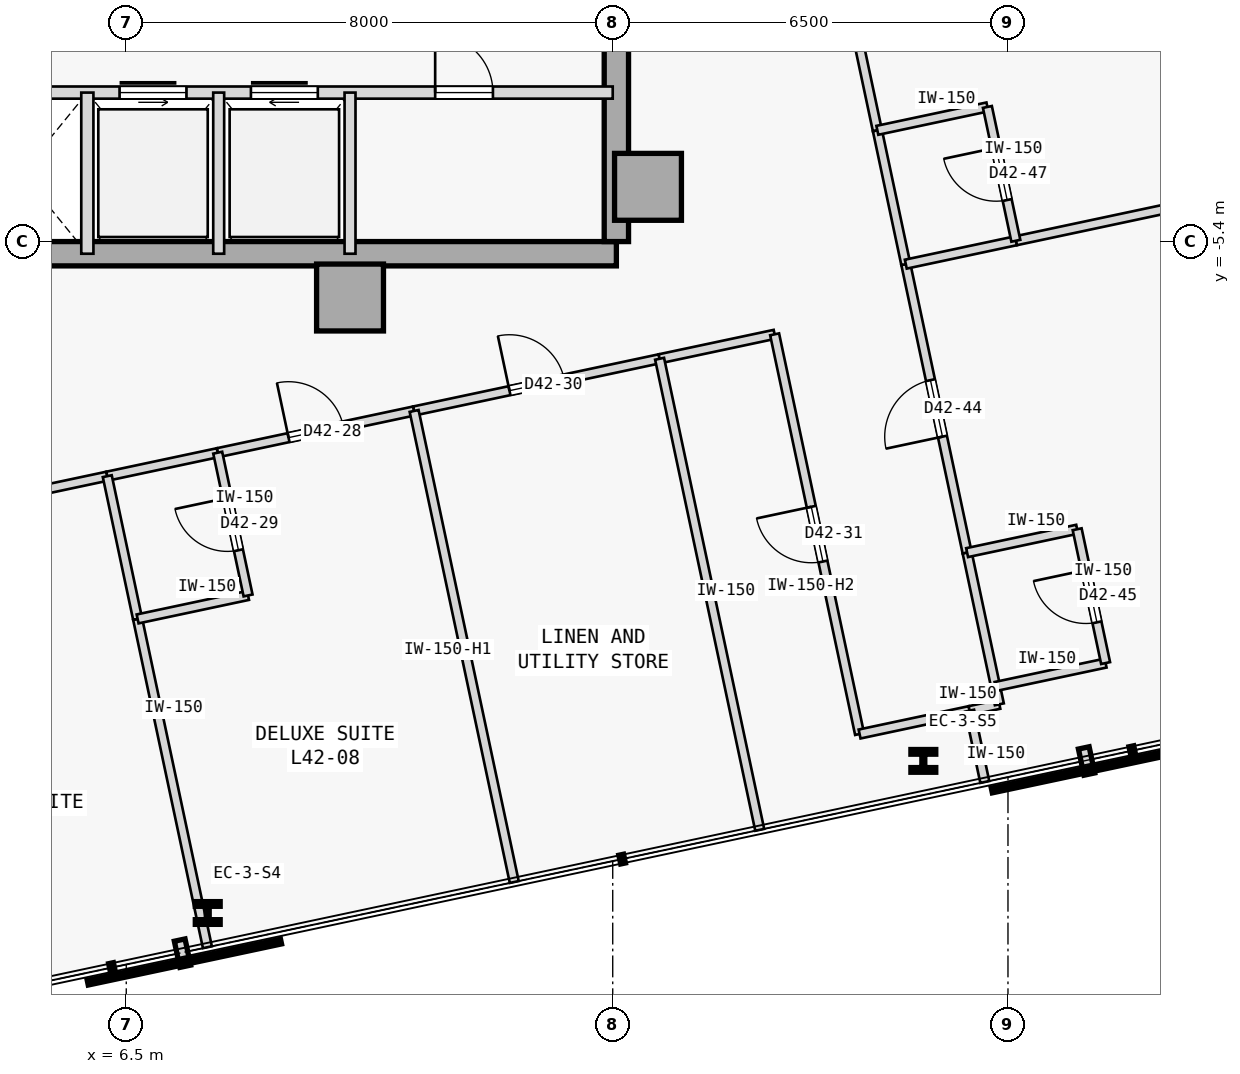
"""IFC4 building model, lengths in metres.
Left out: names, types, materials, properties, quantities, classifications, styles, units other than length and angle.
Written with IfcOpenShell. Run it as: python <this file> out.ifc"""

import sys

from ifc_helpers import new_model, si_unit, direction, frame, frame_2d, origin, origin_2d, place, context, subcontext, project, spatial, rectangle, i_section, extrude, element, fill, save


model = new_model("IFC4")
c1 = context("Model", 3, precision=1e-05, world=origin(), true_north=direction((0.0, 1.0)))
c2 = subcontext(c1, "Body", "Model", "MODEL_VIEW")
j1 = project(units=[si_unit("LENGTHUNIT", "METRE"), si_unit("PLANEANGLEUNIT", "RADIAN")], contexts=[c1])
p1 = place(None, origin())
s1 = spatial("IfcSite", under=j1, at=p1, CompositionType="ELEMENT")
p2 = place(p1, origin())
s2 = spatial("IfcBuilding", under=s1, at=p2, CompositionType="ELEMENT")
p3 = place(p2, frame((0.0, 0.0, 165.0)))
s3 = spatial("IfcBuildingStorey", under=s2, at=p3, CompositionType="ELEMENT", Elevation=165.0)
for number, where, z_axis, x_axis in (
    (1, (15.08, -4.5, 0.0), (0.0, 0.0, 1.0), (1.0, 0.0, 0.0)),
    (2, (10.18, -6.32, 0.0), (0.0, 0.0, 1.0), (1.0, 0.0, 0.0)),
):
    element("IfcColumn", number, at=place(p3, frame(where, z_axis=z_axis, x_axis=x_axis)), inside=s3, PredefinedType="COLUMN", context=c2, shape_type="SweptSolid", body=[
        extrude(rectangle(XDim=1.1, YDim=1.1, at=origin_2d()), origin(), (0.0, 0.0, 1.0), 3.4),
    ])
p4 = place(p3, frame((3.7, -5.6, 0.0), z_axis=(0.0, 0.0, 1.0), x_axis=(1.0, 0.0, 0.0)))
e3 = element("IfcWall", 3, at=p4, inside=s3, PredefinedType="SHEAR", context=c2, shape_type="SweptSolid", body=[
    extrude(rectangle(XDim=10.86, YDim=0.4, at=frame_2d((5.43, 0.0))), origin(), (0.0, 0.0, 1.0), 3.175),
])
p5 = place(p3, frame((14.56, -5.4, 0.0), z_axis=(0.0, 0.0, 1.0), x_axis=(0.0, 1.0, 0.0)))
e4 = element("IfcWall", 4, at=p5, inside=s3, PredefinedType="SHEAR", context=c2, shape_type="SweptSolid", body=[
    extrude(rectangle(XDim=10.8, YDim=0.4, at=frame_2d((5.4, 0.0))), origin(), (0.0, 0.0, 1.0), 3.175),
])
for number, where, z_axis, x_axis in (
    (5, (7.84, -16.441, 0.0), (0.0, 0.0, 1.0), (1.0, 0.0, 0.0)),
    (6, (19.608, -13.94, 0.0), (0.0, 0.0, 1.0), (1.0, 0.0, 0.0)),
):
    element("IfcColumn", number, at=place(p3, frame(where, z_axis=z_axis, x_axis=x_axis)), inside=s3, PredefinedType="COLUMN", context=c2, shape_type="SweptSolid", body=[
        extrude(i_section(OverallWidth=0.409, OverallDepth=0.374, WebThickness=0.048, FlangeThickness=0.077, FilletRadius=0.015, at=origin_2d()), origin(), (0.0, 0.0, 1.0), 3.4),
    ])
p6 = place(p3, frame((3.7, -2.95, 0.0), z_axis=(0.0, 0.0, 1.0), x_axis=(1.0, 0.0, 0.0)))
e7 = element("IfcWall", 7, at=p6, inside=s3, PredefinedType="STANDARD", context=c2, shape_type="SweptSolid", body=[
    extrude(rectangle(XDim=10.8, YDim=0.2, at=frame_2d((5.4, 0.0))), origin(), (0.0, 0.0, 1.0), 3.175),
])
p7 = place(p6, frame((2.69, 0.0, 0.0)))
e8 = element("IfcOpeningElement", 8, at=p7, cuts=e7, PredefinedType="OPENING", context=c2, shape_type="SweptSolid", body=[
    extrude(rectangle(XDim=1.1, YDim=2.15, at=frame_2d((0.55, 1.075))), frame((0.0, 0.11, 0.0), z_axis=(0.0, -1.0, 0.0), x_axis=(1.0, 0.0, 0.0)), (0.0, 0.0, 1.0), 0.22),
])
p8 = place(p6, frame((4.85, 0.0, 0.0)))
e9 = element("IfcOpeningElement", 9, at=p8, cuts=e7, PredefinedType="OPENING", context=c2, shape_type="SweptSolid", body=[
    extrude(rectangle(XDim=1.1, YDim=2.15, at=frame_2d((0.55, 1.075))), frame((0.0, 0.11, 0.0), z_axis=(0.0, -1.0, 0.0), x_axis=(1.0, 0.0, 0.0)), (0.0, 0.0, 1.0), 0.22),
])
p9 = place(p6, frame((7.88, 0.0, 0.0)))
e10 = element("IfcOpeningElement", 10, at=p9, cuts=e7, PredefinedType="OPENING", context=c2, shape_type="SweptSolid", body=[
    extrude(rectangle(XDim=0.95, YDim=2.15, at=frame_2d((0.475, 1.075))), frame((0.0, 0.11, 0.0), z_axis=(0.0, -1.0, 0.0), x_axis=(1.0, 0.0, 0.0)), (0.0, 0.0, 1.0), 0.22),
])
p10 = place(p3, frame((5.86, -5.6, 0.0), z_axis=(0.0, 0.0, 1.0), x_axis=(0.0, 1.0, 0.0)))
e11 = element("IfcWall", 11, at=p10, inside=s3, PredefinedType="STANDARD", context=c2, shape_type="SweptSolid", body=[
    extrude(rectangle(XDim=2.65, YDim=0.2, at=frame_2d((1.325, 0.0))), origin(), (0.0, 0.0, 1.0), 3.175),
])
for number, where, z_axis, x_axis in (
    (12, (10.18, -5.6, 0.0), (0.0, 0.0, 1.0), (0.0, 1.0, 0.0)),
    (13, (8.02, -5.6, 0.0), (0.0, 0.0, 1.0), (0.0, 1.0, 0.0)),
):
    element("IfcWall", number, at=place(p3, frame(where, z_axis=z_axis, x_axis=x_axis)), inside=s3, PredefinedType="STANDARD", context=c2, shape_type="SweptSolid", body=[
        extrude(rectangle(XDim=2.65, YDim=0.18, at=frame_2d((1.325, 0.0))), origin(), (0.0, 0.0, 1.0), 3.175),
    ])
p11 = place(p3, frame((2.743, -9.99, 0.0), z_axis=(0.0, 0.0, 1.0), x_axis=(0.978153036861, 0.207886114205, 0.0)))
e14 = element("IfcWall", 14, at=p11, inside=s3, PredefinedType="PARTITIONING", context=c2, shape_type="SweptSolid", body=[
    extrude(rectangle(XDim=3.522, YDim=0.15, at=frame_2d((1.761, 0.0))), origin(), (0.0, 0.0, 1.0), 3.175),
])
p12 = place(p11, frame((1.301, 0.0, 0.0)))
e15 = element("IfcOpeningElement", 15, at=p12, cuts=e14, PredefinedType="OPENING", context=c2, shape_type="SweptSolid", body=[
    extrude(rectangle(XDim=0.92, YDim=2.15, at=frame_2d((0.46, 1.075))), frame((0.0, 0.085, 0.0), z_axis=(0.0, -1.0, 0.0), x_axis=(1.0, 0.0, 0.0)), (0.0, 0.0, 1.0), 0.17),
])
p13 = place(p3, frame((8.004, -8.872, 0.0), z_axis=(0.0, 0.0, 1.0), x_axis=(0.97814625873, 0.20791800435, 0.0)))
e16 = element("IfcWall", 16, at=p13, inside=s3, PredefinedType="PARTITIONING", context=c2, shape_type="SweptSolid", body=[
    extrude(rectangle(XDim=3.302, YDim=0.15, at=frame_2d((1.651, 0.0))), origin(), (0.0, 0.0, 1.0), 3.175),
])
p14 = place(p13, frame((1.191, 0.0, 0.0)))
e17 = element("IfcOpeningElement", 17, at=p14, cuts=e16, PredefinedType="OPENING", context=c2, shape_type="SweptSolid", body=[
    extrude(rectangle(XDim=0.92, YDim=2.15, at=frame_2d((0.46, 1.075))), frame((0.0, 0.085, 0.0), z_axis=(0.0, -1.0, 0.0), x_axis=(1.0, 0.0, 0.0)), (0.0, 0.0, 1.0), 0.17),
])
p15 = place(p3, frame((6.188, -9.258, 0.0), z_axis=(0.0, 0.0, 1.0), x_axis=(0.978132112624, 0.207984543303, 0.0)))
e18 = element("IfcWall", 18, at=p15, inside=s3, PredefinedType="PARTITIONING", context=c2, shape_type="SweptSolid", body=[
    extrude(rectangle(XDim=1.857, YDim=0.15, at=frame_2d((0.928, 0.0))), origin(), (0.0, 0.0, 1.0), 3.175),
])
p16 = place(p3, frame((11.234, -8.185, 0.0), z_axis=(0.0, 0.0, 1.0), x_axis=(0.978155092113, 0.207876443525, 0.0)))
e19 = element("IfcWall", 19, at=p16, inside=s3, PredefinedType="PARTITIONING", context=c2, shape_type="SweptSolid", body=[
    extrude(rectangle(XDim=4.127, YDim=0.15, at=frame_2d((2.063, 0.0))), origin(), (0.0, 0.0, 1.0), 3.175),
])
p17 = place(p16, frame((1.604, 0.0, 0.0)))
e20 = element("IfcOpeningElement", 20, at=p17, cuts=e19, PredefinedType="OPENING", context=c2, shape_type="SweptSolid", body=[
    extrude(rectangle(XDim=0.92, YDim=2.15, at=frame_2d((0.46, 1.075))), frame((0.0, 0.085, 0.0), z_axis=(0.0, -1.0, 0.0), x_axis=(1.0, 0.0, 0.0)), (0.0, 0.0, 1.0), 0.17),
])
p18 = place(p3, frame((15.271, -7.327, 0.0), z_axis=(0.0, 0.0, 1.0), x_axis=(0.978150188204, 0.207899517354, 0.0)))
e21 = element("IfcWall", 21, at=p18, inside=s3, PredefinedType="PARTITIONING", context=c2, shape_type="SweptSolid", body=[
    extrude(rectangle(XDim=1.934, YDim=0.15, at=frame_2d((0.967, 0.0))), origin(), (0.0, 0.0, 1.0), 3.175),
])
p19 = place(p3, frame((18.56, -13.498, 0.0), z_axis=(0.0, 0.0, 1.0), x_axis=(-0.207888737749, 0.978152479278, 0.0)))
e22 = element("IfcWall", 22, at=p19, inside=s3, PredefinedType="PARTITIONING", context=c2, shape_type="SweptSolid", body=[
    extrude(rectangle(XDim=6.72, YDim=0.15, at=frame_2d((3.36, 0.0))), origin(), (0.0, 0.0, 1.0), 2.575),
])
p20 = place(p19, frame((2.9, 0.0, 0.0)))
e23 = element("IfcOpeningElement", 23, at=p20, cuts=e22, PredefinedType="OPENING", context=c2, shape_type="SweptSolid", body=[
    extrude(rectangle(XDim=0.92, YDim=2.15, at=frame_2d((0.46, 1.075))), frame((0.0, 0.085, 0.0), z_axis=(0.0, -1.0, 0.0), x_axis=(1.0, 0.0, 0.0)), (0.0, 0.0, 1.0), 0.17),
])
p21 = place(p3, frame((18.56, -13.498, 0.0), z_axis=(0.0, 0.0, 1.0), x_axis=(0.978160192495, 0.207852442415, 0.0)))
e24 = element("IfcWall", 24, at=p21, inside=s3, PredefinedType="PARTITIONING", context=c2, shape_type="SweptSolid", body=[
    extrude(rectangle(XDim=1.85, YDim=0.15, at=frame_2d((0.925, 0.0))), origin(), (0.0, 0.0, 1.0), 3.175),
])
p22 = place(p3, frame((20.369, -13.114, 0.0), z_axis=(0.0, 0.0, 1.0), x_axis=(0.978143962546, 0.207928806409, 0.0)))
e25 = element("IfcWall", 25, at=p22, inside=s3, PredefinedType="PARTITIONING", context=c2, shape_type="SweptSolid", body=[
    extrude(rectangle(XDim=0.5, YDim=0.15, at=frame_2d((0.25, 0.0))), origin(), (0.0, 0.0, 1.0), 3.175),
])
p23 = place(p3, frame((20.858, -13.01, 0.0), z_axis=(0.0, 0.0, 1.0), x_axis=(-0.208306395052, 0.978063620518, 0.0)))
e26 = element("IfcWall", 26, at=p23, inside=s3, PredefinedType="PARTITIONING", context=c2, shape_type="SweptSolid", body=[
    extrude(rectangle(XDim=0.3, YDim=0.15, at=frame_2d((0.15, 0.0))), origin(), (0.0, 0.0, 1.0), 3.175),
])
p24 = place(p3, frame((20.328, -10.515, 0.0), z_axis=(0.0, 0.0, 1.0), x_axis=(-0.207950868925, 0.97813927235, 0.0)))
e27 = element("IfcWall", 27, at=p24, inside=s3, PredefinedType="PARTITIONING", context=c2, shape_type="SweptSolid", body=[
    extrude(rectangle(XDim=4.85, YDim=0.15, at=frame_2d((2.425, 0.0))), origin(), (0.0, 0.0, 1.0), 3.175),
])
p25 = place(p24, frame((1.95, 0.0, 0.0)))
e28 = element("IfcOpeningElement", 28, at=p25, cuts=e27, PredefinedType="OPENING", context=c2, shape_type="SweptSolid", body=[
    extrude(rectangle(XDim=0.95, YDim=2.15, at=frame_2d((0.475, 1.075))), frame((0.0, 0.085, 0.0), z_axis=(0.0, -1.0, 0.0), x_axis=(1.0, 0.0, 0.0)), (0.0, 0.0, 1.0), 0.17),
])
p26 = place(p3, frame((20.796, -12.716, 0.0), z_axis=(0.0, 0.0, 1.0), x_axis=(-0.207891197838, 0.978151956427, 0.0)))
e29 = element("IfcWall", 29, at=p26, inside=s3, PredefinedType="PARTITIONING", context=c2, shape_type="SweptSolid", body=[
    extrude(rectangle(XDim=2.25, YDim=0.15, at=frame_2d((1.125, 0.0))), origin(), (0.0, 0.0, 1.0), 3.175),
])
p27 = place(p3, frame((18.852, -3.571, 0.0), z_axis=(0.0, 0.0, 1.0), x_axis=(-0.207879907349, 0.978154355979, 0.0)))
e30 = element("IfcWall", 30, at=p27, inside=s3, PredefinedType="PARTITIONING", context=c2, shape_type="SweptSolid", body=[
    extrude(rectangle(XDim=6.35, YDim=0.15, at=frame_2d((3.175, 0.0))), origin(), (0.0, 0.0, 1.0), 3.175),
])
p28 = place(p27, frame((2.7, 0.0, 0.0)))
e31 = element("IfcOpeningElement", 31, at=p28, cuts=e30, PredefinedType="OPENING", context=c2, shape_type="SweptSolid", body=[
    extrude(rectangle(XDim=0.95, YDim=2.15, at=frame_2d((0.475, 1.075))), frame((0.0, 0.085, 0.0), z_axis=(0.0, -1.0, 0.0), x_axis=(1.0, 0.0, 0.0)), (0.0, 0.0, 1.0), 0.17),
])
p29 = place(p3, frame((19.32, -5.771, 0.0), z_axis=(0.0, 0.0, 1.0), x_axis=(-0.207913264065, 0.978147266328, 0.0)))
e32 = element("IfcWall", 32, at=p29, inside=s3, PredefinedType="PARTITIONING", context=c2, shape_type="SweptSolid", body=[
    extrude(rectangle(XDim=2.25, YDim=0.15, at=frame_2d((1.125, 0.0))), origin(), (0.0, 0.0, 1.0), 3.175),
])
p30 = place(p3, frame((7.834, -17.005, 0.0), z_axis=(0.0, 0.0, 1.0), x_axis=(-0.207882560392, 0.978153792144, 0.0)))
e33 = element("IfcWall", 33, at=p30, inside=s3, PredefinedType="PARTITIONING", context=c2, shape_type="SweptSolid", body=[
    extrude(rectangle(XDim=5.52, YDim=0.15, at=frame_2d((2.76, 0.0))), origin(), (0.0, 0.0, 1.0), 3.175),
])
p31 = place(p3, frame((6.687, -11.606, 0.0), z_axis=(0.0, 0.0, 1.0), x_axis=(-0.207917150959, 0.978146440129, 0.0)))
e34 = element("IfcWall", 34, at=p31, inside=s3, PredefinedType="PARTITIONING", context=c2, shape_type="SweptSolid", body=[
    extrude(rectangle(XDim=2.4, YDim=0.15, at=frame_2d((1.2, 0.0))), origin(), (0.0, 0.0, 1.0), 3.175),
])
p32 = place(p3, frame((6.687, -11.606, 0.0), z_axis=(0.0, 0.0, 1.0), x_axis=(0.978132112624, 0.207984543303, 0.0)))
e35 = element("IfcWall", 35, at=p32, inside=s3, PredefinedType="PARTITIONING", context=c2, shape_type="SweptSolid", body=[
    extrude(rectangle(XDim=1.857, YDim=0.15, at=frame_2d((0.928, 0.0))), origin(), (0.0, 0.0, 1.0), 3.175),
])
p33 = place(p3, frame((8.503, -11.219, 0.0), z_axis=(0.0, 0.0, 1.0), x_axis=(-0.207917150959, 0.978146440129, 0.0)))
e36 = element("IfcWall", 36, at=p33, inside=s3, PredefinedType="PARTITIONING", context=c2, shape_type="SweptSolid", body=[
    extrude(rectangle(XDim=2.4, YDim=0.15, at=frame_2d((1.2, 0.0))), origin(), (0.0, 0.0, 1.0), 3.175),
])
p34 = place(p33, frame((0.76, 0.0, 0.0)))
e37 = element("IfcOpeningElement", 37, at=p34, cuts=e36, PredefinedType="OPENING", context=c2, shape_type="SweptSolid", body=[
    extrude(rectangle(XDim=0.88, YDim=2.15, at=frame_2d((0.44, 1.075))), frame((0.0, 0.085, 0.0), z_axis=(0.0, -1.0, 0.0), x_axis=(1.0, 0.0, 0.0)), (0.0, 0.0, 1.0), 0.17),
])
p35 = place(p3, frame((12.881, -15.932, 0.0), z_axis=(0.0, 0.0, 1.0), x_axis=(-0.207916267651, 0.978146627887, 0.0)))
e38 = element("IfcWall", 38, at=p35, inside=s3, PredefinedType="PARTITIONING", context=c2, shape_type="SweptSolid", body=[
    extrude(rectangle(XDim=7.92, YDim=0.15, at=frame_2d((3.96, 0.0))), origin(), (0.0, 0.0, 1.0), 2.725),
])
p36 = place(p3, frame((16.917, -15.074, 0.0), z_axis=(0.0, 0.0, 1.0), x_axis=(-0.207922536845, 0.978145295277, 0.0)))
e39 = element("IfcWall", 39, at=p36, inside=s3, PredefinedType="PARTITIONING", context=c2, shape_type="SweptSolid", body=[
    extrude(rectangle(XDim=7.92, YDim=0.15, at=frame_2d((3.96, 0.0))), origin(), (0.0, 0.0, 1.0), 3.175),
])
p37 = place(p3, frame((20.619, -14.288, 0.0), z_axis=(0.0, 0.0, 1.0), x_axis=(-0.207917150959, 0.978146440129, 0.0)))
e40 = element("IfcWall", 40, at=p37, inside=s3, PredefinedType="PARTITIONING", context=c2, shape_type="SweptSolid", body=[
    extrude(rectangle(XDim=1.2, YDim=0.15, at=frame_2d((0.6, 0.0))), origin(), (0.0, 0.0, 1.0), 3.175),
])
for number, where, z_axis, x_axis in (
    (41, (20.796, -12.716, 0.0), (0.0, 0.0, 1.0), (0.978, 0.208, 0.0)),
    (42, (20.328, -10.515, 0.0), (0.0, 0.0, 1.0), (0.978, 0.208, 0.0)),
):
    element("IfcWall", number, at=place(p3, frame(where, z_axis=z_axis, x_axis=x_axis)), inside=s3, PredefinedType="PARTITIONING", context=c2, shape_type="SweptSolid", body=[
        extrude(rectangle(XDim=1.85, YDim=0.15, at=frame_2d((0.925, 0.0))), origin(), (0.0, 0.0, 1.0), 3.175),
    ])
p38 = place(p3, frame((22.605, -12.332, 0.0), z_axis=(0.0, 0.0, 1.0), x_axis=(-0.207891197838, 0.978151956427, 0.0)))
e43 = element("IfcWall", 43, at=p38, inside=s3, PredefinedType="PARTITIONING", context=c2, shape_type="SweptSolid", body=[
    extrude(rectangle(XDim=2.25, YDim=0.15, at=frame_2d((1.125, 0.0))), origin(), (0.0, 0.0, 1.0), 3.175),
])
p39 = place(p38, frame((0.685, 0.0, 0.0)))
e44 = element("IfcOpeningElement", 44, at=p39, cuts=e43, PredefinedType="OPENING", context=c2, shape_type="SweptSolid", body=[
    extrude(rectangle(XDim=0.88, YDim=2.15, at=frame_2d((0.44, 1.075))), frame((0.0, 0.085, 0.0), z_axis=(0.0, -1.0, 0.0), x_axis=(1.0, 0.0, 0.0)), (0.0, 0.0, 1.0), 0.17),
])
p40 = place(p3, frame((21.129, -5.387, 0.0), z_axis=(0.0, 0.0, 1.0), x_axis=(0.97814556055, 0.207921288896, 0.0)))
e45 = element("IfcWall", 45, at=p40, inside=s3, PredefinedType="PARTITIONING", context=c2, shape_type="SweptSolid", body=[
    extrude(rectangle(XDim=12.187, YDim=0.15, at=frame_2d((6.094, 0.0))), origin(), (0.0, 0.0, 1.0), 2.725),
])
p41 = place(p3, frame((19.32, -5.771, 0.0), z_axis=(0.0, 0.0, 1.0), x_axis=(0.978165892835, 0.207825614625, 0.0)))
e46 = element("IfcWall", 46, at=p41, inside=s3, PredefinedType="PARTITIONING", context=c2, shape_type="SweptSolid", body=[
    extrude(rectangle(XDim=1.85, YDim=0.15, at=frame_2d((0.925, 0.0))), origin(), (0.0, 0.0, 1.0), 3.175),
])
p42 = place(p3, frame((18.852, -3.571, 0.0), z_axis=(0.0, 0.0, 1.0), x_axis=(0.978139061018, 0.207951862966, 0.0)))
e47 = element("IfcWall", 47, at=p42, inside=s3, PredefinedType="PARTITIONING", context=c2, shape_type="SweptSolid", body=[
    extrude(rectangle(XDim=1.85, YDim=0.15, at=frame_2d((0.925, 0.0))), origin(), (0.0, 0.0, 1.0), 3.175),
])
p43 = place(p3, frame((21.129, -5.387, 0.0), z_axis=(0.0, 0.0, 1.0), x_axis=(-0.207891197838, 0.978151956427, 0.0)))
e48 = element("IfcWall", 48, at=p43, inside=s3, PredefinedType="PARTITIONING", context=c2, shape_type="SweptSolid", body=[
    extrude(rectangle(XDim=2.25, YDim=0.15, at=frame_2d((1.125, 0.0))), origin(), (0.0, 0.0, 1.0), 3.175),
])
p44 = place(p43, frame((0.685, 0.0, 0.0)))
e49 = element("IfcOpeningElement", 49, at=p44, cuts=e48, PredefinedType="OPENING", context=c2, shape_type="SweptSolid", body=[
    extrude(rectangle(XDim=0.88, YDim=2.15, at=frame_2d((0.44, 1.075))), frame((0.0, 0.085, 0.0), z_axis=(0.0, -1.0, 0.0), x_axis=(1.0, 0.0, 0.0)), (0.0, 0.0, 1.0), 0.17),
])
p45 = place(p7, origin())
e50 = element("IfcDoor", 50, at=p45, inside=s3, OperationType="SLIDING_TO_LEFT", PredefinedType="DOOR", context=c2, shape_type="SweptSolid", body=[
    extrude(rectangle(XDim=1.1, YDim=2.15, at=frame_2d((0.55, 1.075))), frame((0.0, 0.025, 0.0), z_axis=(0.0, -1.0, 0.0), x_axis=(1.0, 0.0, 0.0)), (0.0, 0.0, 1.0), 0.05),
])
fill(e8, e50)
p46 = place(p8, origin())
e51 = element("IfcDoor", 51, at=p46, inside=s3, OperationType="SLIDING_TO_RIGHT", PredefinedType="DOOR", context=c2, shape_type="SweptSolid", body=[
    extrude(rectangle(XDim=1.1, YDim=2.15, at=frame_2d((0.55, 1.075))), frame((0.0, 0.025, 0.0), z_axis=(0.0, -1.0, 0.0), x_axis=(1.0, 0.0, 0.0)), (0.0, 0.0, 1.0), 0.05),
])
fill(e9, e51)
p47 = place(p9, origin())
e52 = element("IfcDoor", 52, at=p47, inside=s3, OperationType="SINGLE_SWING_LEFT", PredefinedType="DOOR", context=c2, shape_type="SweptSolid", body=[
    extrude(rectangle(XDim=0.95, YDim=2.15, at=frame_2d((0.475, 1.075))), frame((0.0, 0.025, 0.0), z_axis=(0.0, -1.0, 0.0), x_axis=(1.0, 0.0, 0.0)), (0.0, 0.0, 1.0), 0.05),
])
fill(e10, e52)
p48 = place(p14, origin())
e53 = element("IfcDoor", 53, at=p48, inside=s3, OperationType="SINGLE_SWING_LEFT", PredefinedType="DOOR", context=c2, shape_type="SweptSolid", body=[
    extrude(rectangle(XDim=0.92, YDim=2.15, at=frame_2d((0.46, 1.075))), frame((0.0, 0.025, 0.0), z_axis=(0.0, -1.0, 0.0), x_axis=(1.0, 0.0, 0.0)), (0.0, 0.0, 1.0), 0.05),
])
fill(e17, e53)
p49 = place(p34, origin())
e54 = element("IfcDoor", 54, at=p49, inside=s3, OperationType="SINGLE_SWING_RIGHT", PredefinedType="DOOR", context=c2, shape_type="SweptSolid", body=[
    extrude(rectangle(XDim=0.88, YDim=2.15, at=frame_2d((0.44, 1.075))), frame((0.0, 0.025, 0.0), z_axis=(0.0, -1.0, 0.0), x_axis=(1.0, 0.0, 0.0)), (0.0, 0.0, 1.0), 0.05),
])
fill(e37, e54)
p50 = place(p17, origin())
e55 = element("IfcDoor", 55, at=p50, inside=s3, OperationType="SINGLE_SWING_LEFT", PredefinedType="DOOR", context=c2, shape_type="SweptSolid", body=[
    extrude(rectangle(XDim=0.92, YDim=2.15, at=frame_2d((0.46, 1.075))), frame((0.0, 0.025, 0.0), z_axis=(0.0, -1.0, 0.0), x_axis=(1.0, 0.0, 0.0)), (0.0, 0.0, 1.0), 0.05),
])
fill(e20, e55)
p51 = place(p20, origin())
e56 = element("IfcDoor", 56, at=p51, inside=s3, OperationType="SINGLE_SWING_RIGHT", PredefinedType="DOOR", context=c2, shape_type="SweptSolid", body=[
    extrude(rectangle(XDim=0.92, YDim=2.15, at=frame_2d((0.46, 1.075))), frame((0.0, 0.025, 0.0), z_axis=(0.0, -1.0, 0.0), x_axis=(1.0, 0.0, 0.0)), (0.0, 0.0, 1.0), 0.05),
])
fill(e23, e56)
p52 = place(p25, origin())
e57 = element("IfcDoor", 57, at=p52, inside=s3, OperationType="SINGLE_SWING_LEFT", PredefinedType="DOOR", context=c2, shape_type="SweptSolid", body=[
    extrude(rectangle(XDim=0.95, YDim=2.15, at=frame_2d((0.475, 1.075))), frame((0.0, 0.025, 0.0), z_axis=(0.0, -1.0, 0.0), x_axis=(1.0, 0.0, 0.0)), (0.0, 0.0, 1.0), 0.05),
])
fill(e28, e57)
p53 = place(p39, origin())
e58 = element("IfcDoor", 58, at=p53, inside=s3, OperationType="SINGLE_SWING_RIGHT", PredefinedType="DOOR", context=c2, shape_type="SweptSolid", body=[
    extrude(rectangle(XDim=0.88, YDim=2.15, at=frame_2d((0.44, 1.075))), frame((0.0, 0.025, 0.0), z_axis=(0.0, -1.0, 0.0), x_axis=(1.0, 0.0, 0.0)), (0.0, 0.0, 1.0), 0.05),
])
fill(e44, e58)
p54 = place(p44, origin())
e59 = element("IfcDoor", 59, at=p54, inside=s3, OperationType="SINGLE_SWING_RIGHT", PredefinedType="DOOR", context=c2, shape_type="SweptSolid", body=[
    extrude(rectangle(XDim=0.88, YDim=2.15, at=frame_2d((0.44, 1.075))), frame((0.0, 0.025, 0.0), z_axis=(0.0, -1.0, 0.0), x_axis=(1.0, 0.0, 0.0)), (0.0, 0.0, 1.0), 0.05),
])
fill(e49, e59)
save(model, sys.argv[1])
